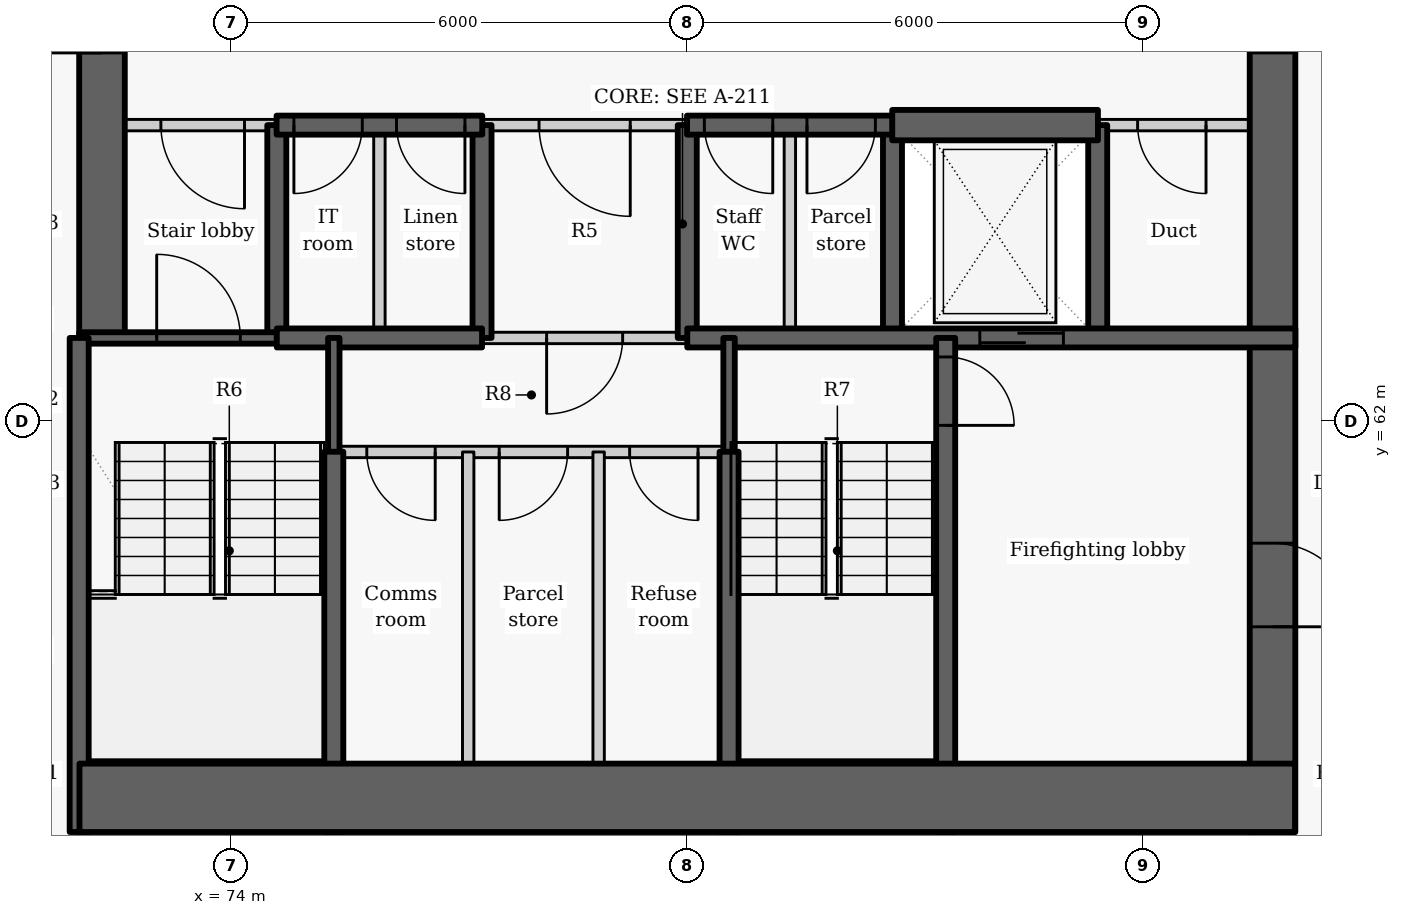
"""IFC4 building model, lengths in metres.
Left out: names, types, materials, properties, quantities, classifications, styles, units other than length and angle.
Written with IfcOpenShell. Run it as: python <this file> out.ifc"""

import sys

from ifc_helpers import new_model, si_unit, direction, frame, frame_2d, origin, place, context, subcontext, project, spatial, rectangle, extrude, element, fill, save


model = new_model("IFC4")
c1 = context("Model", 3, precision=1e-05, world=origin(), true_north=direction((0.0, 1.0)))
c2 = subcontext(c1, "Body", "Model", "MODEL_VIEW")
j1 = project(units=[si_unit("LENGTHUNIT", "METRE"), si_unit("PLANEANGLEUNIT", "RADIAN")], contexts=[c1])
p1 = place(None, origin())
s1 = spatial("IfcSite", under=j1, at=p1, CompositionType="ELEMENT")
p2 = place(p1, origin())
s2 = spatial("IfcBuilding", under=s1, at=p2, CompositionType="ELEMENT")
p3 = place(p2, frame((0.0, 0.0, 41.4)))
s3 = spatial("IfcBuildingStorey", under=s2, at=p3, CompositionType="ELEMENT", Elevation=41.4)
p4 = place(p3, frame((74.6, 63.1, -0.275), z_axis=(0.0, 0.0, 1.0), x_axis=(0.0, 1.0, 0.0)))
e1 = element("IfcWall", 1, at=p4, inside=s3, PredefinedType="SHEAR", context=c2, shape_type="SweptSolid", body=[
    extrude(rectangle(XDim=2.8, YDim=0.25, at=frame_2d((1.4, 0.0))), origin(), (0.0, 0.0, 1.0), 3.3),
])
p5 = place(p3, frame((72.3, 63.1, -0.275), z_axis=(0.0, 0.0, 1.0), x_axis=(0.0, 1.0, 0.0)))
e2 = element("IfcWall", 2, at=p5, inside=s3, PredefinedType="SHEAR", context=c2, shape_type="SweptSolid", body=[
    extrude(rectangle(XDim=9.1, YDim=0.6, at=frame_2d((4.55, 0.0))), origin(), (0.0, 0.0, 1.0), 3.3),
])
p6 = place(p5, frame((3.75, 0.0, 0.275)))
e3 = element("IfcOpeningElement", 3, at=p6, cuts=e2, PredefinedType="OPENING", context=c2, shape_type="SweptSolid", body=[
    extrude(rectangle(XDim=1.5, YDim=2.1, at=frame_2d((0.75, 1.05))), frame((0.0, 0.31, 0.0), z_axis=(0.0, -1.0, 0.0), x_axis=(1.0, 0.0, 0.0)), (0.0, 0.0, 1.0), 0.62),
])
for number, where, z_axis, x_axis in (
    (4, (77.3, 63.1, -0.275), (0.0, 0.0, 1.0), (0.0, 1.0, 0.0)),
    (5, (80.0, 63.1, -0.275), (0.0, 0.0, 1.0), (0.0, 1.0, 0.0)),
    (6, (82.7, 63.1, -0.275), (0.0, 0.0, 1.0), (0.0, 1.0, 0.0)),
    (7, (85.4, 63.1, -0.275), (0.0, 0.0, 1.0), (0.0, 1.0, 0.0)),
):
    element("IfcWall", number, at=place(p3, frame(where, z_axis=z_axis, x_axis=x_axis)), inside=s3, PredefinedType="SHEAR", context=c2, shape_type="SweptSolid", body=[
        extrude(rectangle(XDim=2.8, YDim=0.25, at=frame_2d((1.4, 0.0))), origin(), (0.0, 0.0, 1.0), 3.3),
    ])
p7 = place(p3, frame((87.7, 72.2, -0.275), z_axis=(0.0, 0.0, 1.0), x_axis=(0.0, -1.0, 0.0)))
e8 = element("IfcWall", 8, at=p7, inside=s3, PredefinedType="SHEAR", context=c2, shape_type="SweptSolid", body=[
    extrude(rectangle(XDim=15.6, YDim=0.6, at=frame_2d((7.8, 0.0))), origin(), (0.0, 0.0, 1.0), 3.3),
])
p8 = place(p7, frame((3.85, 0.0, 0.275)))
e9 = element("IfcOpeningElement", 9, at=p8, cuts=e8, PredefinedType="OPENING", context=c2, shape_type="SweptSolid", body=[
    extrude(rectangle(XDim=1.5, YDim=2.1, at=frame_2d((0.75, 1.05))), frame((0.0, 0.31, 0.0), z_axis=(0.0, -1.0, 0.0), x_axis=(1.0, 0.0, 0.0)), (0.0, 0.0, 1.0), 0.62),
])
p9 = place(p7, frame((11.8, 0.0, 0.275)))
e10 = element("IfcOpeningElement", 10, at=p9, cuts=e8, PredefinedType="OPENING", context=c2, shape_type="SweptSolid", body=[
    extrude(rectangle(XDim=1.1, YDim=2.1, at=frame_2d((0.55, 1.05))), frame((0.0, 0.31, 0.0), z_axis=(0.0, -1.0, 0.0), x_axis=(1.0, 0.0, 0.0)), (0.0, 0.0, 1.0), 0.62),
])
p10 = place(p3, frame((74.603, 65.9, 0.0), z_axis=(0.0, 0.0, 1.0), x_axis=(-1.0, 0.0, 0.0)))
e11 = element("IfcWall", 11, at=p10, inside=s3, PredefinedType="PARTITIONING", context=c2, shape_type="SweptSolid", body=[
    extrude(rectangle(XDim=2.603, YDim=0.15, at=frame_2d((1.302, 0.0))), origin(), (0.0, 0.0, 1.0), 3.025),
])
p11 = place(p10, frame((0.428, 0.0, 0.0)))
e12 = element("IfcOpeningElement", 12, at=p11, cuts=e11, PredefinedType="OPENING", context=c2, shape_type="SweptSolid", body=[
    extrude(rectangle(XDim=1.1, YDim=2.1, at=frame_2d((0.55, 1.05))), frame((0.0, 0.085, 0.0), z_axis=(0.0, -1.0, 0.0), x_axis=(1.0, 0.0, 0.0)), (0.0, 0.0, 1.0), 0.17),
])
p12 = place(p3, frame((80.003, 65.9, 0.0), z_axis=(0.0, 0.0, 1.0), x_axis=(-1.0, 0.0, 0.0)))
e13 = element("IfcWall", 13, at=p12, inside=s3, PredefinedType="PARTITIONING", context=c2, shape_type="SweptSolid", body=[
    extrude(rectangle(XDim=2.706, YDim=0.15, at=frame_2d((1.353, 0.0))), origin(), (0.0, 0.0, 1.0), 3.025),
])
p13 = place(p12, frame((0.753, 0.0, 0.0)))
e14 = element("IfcOpeningElement", 14, at=p13, cuts=e13, PredefinedType="OPENING", context=c2, shape_type="SweptSolid", body=[
    extrude(rectangle(XDim=1.2, YDim=2.1, at=frame_2d((0.6, 1.05))), frame((0.0, 0.085, 0.0), z_axis=(0.0, -1.0, 0.0), x_axis=(1.0, 0.0, 0.0)), (0.0, 0.0, 1.0), 0.17),
])
p14 = place(p3, frame((88.0, 65.9, 0.0), z_axis=(0.0, 0.0, 1.0), x_axis=(-1.0, 0.0, 0.0)))
e15 = element("IfcWall", 15, at=p14, inside=s3, PredefinedType="PARTITIONING", context=c2, shape_type="SweptSolid", body=[
    extrude(rectangle(XDim=2.603, YDim=0.15, at=frame_2d((1.302, 0.0))), origin(), (0.0, 0.0, 1.0), 3.025),
])
p15 = place(p14, frame((1.175, 0.0, 0.0)))
e16 = element("IfcOpeningElement", 16, at=p15, cuts=e15, PredefinedType="OPENING", context=c2, shape_type="SweptSolid", body=[
    extrude(rectangle(XDim=0.9, YDim=2.1, at=frame_2d((0.45, 1.05))), frame((0.0, 0.085, 0.0), z_axis=(0.0, -1.0, 0.0), x_axis=(1.0, 0.0, 0.0)), (0.0, 0.0, 1.0), 0.17),
])
p16 = place(p3, frame((77.303, 65.9, -0.275), z_axis=(0.0, 0.0, 1.0), x_axis=(-1.0, 0.0, 0.0)))
e17 = element("IfcWall", 17, at=p16, inside=s3, PredefinedType="SHEAR", context=c2, shape_type="SweptSolid", body=[
    extrude(rectangle(XDim=2.706, YDim=0.25, at=frame_2d((1.353, 0.0))), origin(), (0.0, 0.0, 1.0), 3.3),
])
p17 = place(p16, frame((1.578, 0.0, 0.275)))
e18 = element("IfcOpeningElement", 18, at=p17, cuts=e17, PredefinedType="OPENING", context=c2, shape_type="SweptSolid", body=[
    extrude(rectangle(XDim=0.9, YDim=2.1, at=frame_2d((0.45, 1.05))), frame((0.0, 0.135, 0.0), z_axis=(0.0, -1.0, 0.0), x_axis=(1.0, 0.0, 0.0)), (0.0, 0.0, 1.0), 0.27),
])
p18 = place(p16, frame((0.228, 0.0, 0.275)))
e19 = element("IfcOpeningElement", 19, at=p18, cuts=e17, PredefinedType="OPENING", context=c2, shape_type="SweptSolid", body=[
    extrude(rectangle(XDim=0.9, YDim=2.1, at=frame_2d((0.45, 1.05))), frame((0.0, 0.135, 0.0), z_axis=(0.0, -1.0, 0.0), x_axis=(1.0, 0.0, 0.0)), (0.0, 0.0, 1.0), 0.27),
])
p19 = place(p3, frame((82.703, 65.9, -0.275), z_axis=(0.0, 0.0, 1.0), x_axis=(-1.0, 0.0, 0.0)))
e20 = element("IfcWall", 20, at=p19, inside=s3, PredefinedType="SHEAR", context=c2, shape_type="SweptSolid", body=[
    extrude(rectangle(XDim=2.706, YDim=0.25, at=frame_2d((1.353, 0.0))), origin(), (0.0, 0.0, 1.0), 3.3),
])
p20 = place(p19, frame((1.578, 0.0, 0.275)))
e21 = element("IfcOpeningElement", 21, at=p20, cuts=e20, PredefinedType="OPENING", context=c2, shape_type="SweptSolid", body=[
    extrude(rectangle(XDim=0.9, YDim=2.1, at=frame_2d((0.45, 1.05))), frame((0.0, 0.135, 0.0), z_axis=(0.0, -1.0, 0.0), x_axis=(1.0, 0.0, 0.0)), (0.0, 0.0, 1.0), 0.27),
])
p21 = place(p19, frame((0.228, 0.0, 0.275)))
e22 = element("IfcOpeningElement", 22, at=p21, cuts=e20, PredefinedType="OPENING", context=c2, shape_type="SweptSolid", body=[
    extrude(rectangle(XDim=0.9, YDim=2.1, at=frame_2d((0.45, 1.05))), frame((0.0, 0.135, 0.0), z_axis=(0.0, -1.0, 0.0), x_axis=(1.0, 0.0, 0.0)), (0.0, 0.0, 1.0), 0.27),
])
p22 = place(p3, frame((82.697, 65.9, -0.275), z_axis=(0.0, 0.0, 1.0), x_axis=(1.0, 0.0, 0.0)))
e23 = element("IfcWall", 23, at=p22, inside=s3, PredefinedType="SHEAR", context=c2, shape_type="SweptSolid", body=[
    extrude(rectangle(XDim=2.706, YDim=0.4, at=frame_2d((1.353, 0.0))), origin(), (0.0, 0.0, 1.0), 3.3),
])
p23 = place(p3, frame((72.0, 63.1, -0.275), z_axis=(0.0, 0.0, 1.0), x_axis=(1.0, 0.0, 0.0)))
e24 = element("IfcWall", 24, at=p23, inside=s3, PredefinedType="SHEAR", context=c2, shape_type="SweptSolid", body=[
    extrude(rectangle(XDim=2.6, YDim=0.15, at=frame_2d((1.3, 0.0))), origin(), (0.0, 0.0, 1.0), 3.3),
])
p24 = place(p23, frame((1.02, 0.0, 0.275)))
e25 = element("IfcOpeningElement", 25, at=p24, cuts=e24, PredefinedType="OPENING", context=c2, shape_type="SweptSolid", body=[
    extrude(rectangle(XDim=1.1, YDim=2.1, at=frame_2d((0.55, 1.05))), frame((0.0, 0.085, 0.0), z_axis=(0.0, -1.0, 0.0), x_axis=(1.0, 0.0, 0.0)), (0.0, 0.0, 1.0), 0.17),
])
p25 = place(p3, frame((75.95, 63.1, 0.0), z_axis=(0.0, 0.0, 1.0), x_axis=(0.0, 1.0, 0.0)))
e26 = element("IfcWall", 26, at=p25, inside=s3, PredefinedType="PARTITIONING", context=c2, shape_type="SweptSolid", body=[
    extrude(rectangle(XDim=2.8, YDim=0.15, at=frame_2d((1.4, 0.0))), origin(), (0.0, 0.0, 1.0), 3.025),
])
p26 = place(p3, frame((74.6, 63.1, -0.275), z_axis=(0.0, 0.0, 1.0), x_axis=(1.0, 0.0, 0.0)))
e27 = element("IfcWall", 27, at=p26, inside=s3, PredefinedType="SHEAR", context=c2, shape_type="SweptSolid", body=[
    extrude(rectangle(XDim=2.7, YDim=0.25, at=frame_2d((1.35, 0.0))), origin(), (0.0, 0.0, 1.0), 3.3),
])
p27 = place(p3, frame((80.0, 63.1, -0.275), z_axis=(0.0, 0.0, 1.0), x_axis=(1.0, 0.0, 0.0)))
e28 = element("IfcWall", 28, at=p27, inside=s3, PredefinedType="SHEAR", context=c2, shape_type="SweptSolid", body=[
    extrude(rectangle(XDim=8.0, YDim=0.25, at=frame_2d((4.0, 0.0))), origin(), (0.0, 0.0, 1.0), 3.3),
])
p28 = place(p27, frame((3.849, 0.0, 0.275)))
e29 = element("IfcOpeningElement", 29, at=p28, cuts=e28, PredefinedType="OPENING", context=c2, shape_type="SweptSolid", body=[
    extrude(rectangle(XDim=1.1, YDim=2.1, at=frame_2d((0.55, 1.05))), frame((0.0, 0.135, 0.0), z_axis=(0.0, -1.0, 0.0), x_axis=(1.0, 0.0, 0.0)), (0.0, 0.0, 1.0), 0.27),
])
p29 = place(p3, frame((80.0, 63.1, 0.0), z_axis=(0.0, 0.0, 1.0), x_axis=(-1.0, 0.0, 0.0)))
e30 = element("IfcWall", 30, at=p29, inside=s3, PredefinedType="PARTITIONING", context=c2, shape_type="SweptSolid", body=[
    extrude(rectangle(XDim=2.7, YDim=0.15, at=frame_2d((1.35, 0.0))), origin(), (0.0, 0.0, 1.0), 3.025),
])
p30 = place(p29, frame((0.85, 0.0, 0.0)))
e31 = element("IfcOpeningElement", 31, at=p30, cuts=e30, PredefinedType="OPENING", context=c2, shape_type="SweptSolid", body=[
    extrude(rectangle(XDim=1.0, YDim=2.1, at=frame_2d((0.5, 1.05))), frame((0.0, 0.085, 0.0), z_axis=(0.0, -1.0, 0.0), x_axis=(1.0, 0.0, 0.0)), (0.0, 0.0, 1.0), 0.17),
])
p31 = place(p3, frame((81.35, 63.1, 0.0), z_axis=(0.0, 0.0, 1.0), x_axis=(0.0, 1.0, 0.0)))
e32 = element("IfcWall", 32, at=p31, inside=s3, PredefinedType="PARTITIONING", context=c2, shape_type="SweptSolid", body=[
    extrude(rectangle(XDim=2.8, YDim=0.15, at=frame_2d((1.4, 0.0))), origin(), (0.0, 0.0, 1.0), 3.025),
])
p32 = place(p3, frame((75.35, 61.597, -0.275), z_axis=(0.0, 0.0, 1.0), x_axis=(0.0, 1.0, 0.0)))
e33 = element("IfcWall", 33, at=p32, inside=s3, PredefinedType="SHEAR", context=c2, shape_type="SweptSolid", body=[
    extrude(rectangle(XDim=1.503, YDim=0.15, at=frame_2d((0.751, 0.0))), origin(), (0.0, 0.0, 1.0), 3.3),
])
p33 = place(p3, frame((75.35, 56.6, -0.275), z_axis=(0.0, 0.0, 1.0), x_axis=(0.0, 1.0, 0.0)))
e34 = element("IfcWall", 34, at=p33, inside=s3, PredefinedType="SHEAR", context=c2, shape_type="SweptSolid", body=[
    extrude(rectangle(XDim=5.003, YDim=0.25, at=frame_2d((2.501, 0.0))), origin(), (0.0, 0.0, 1.0), 3.3),
])
p34 = place(p3, frame((72.0, 56.6, -0.275), z_axis=(0.0, 0.0, 1.0), x_axis=(0.0, 1.0, 0.0)))
e35 = element("IfcWall", 35, at=p34, inside=s3, PredefinedType="SHEAR", context=c2, shape_type="SweptSolid", body=[
    extrude(rectangle(XDim=6.5, YDim=0.25, at=frame_2d((3.25, 0.0))), origin(), (0.0, 0.0, 1.0), 3.3),
])
p35 = place(p3, frame((83.4, 63.1, -0.275), z_axis=(0.0, 0.0, 1.0), x_axis=(0.0, -1.0, 0.0)))
e36 = element("IfcWall", 36, at=p35, inside=s3, PredefinedType="SHEAR", context=c2, shape_type="SweptSolid", body=[
    extrude(rectangle(XDim=6.5, YDim=0.25, at=frame_2d((3.25, 0.0))), origin(), (0.0, 0.0, 1.0), 3.3),
])
p36 = place(p35, frame((0.25, 0.0, 0.275)))
e37 = element("IfcOpeningElement", 37, at=p36, cuts=e36, PredefinedType="OPENING", context=c2, shape_type="SweptSolid", body=[
    extrude(rectangle(XDim=0.9, YDim=2.1, at=frame_2d((0.45, 1.05))), frame((0.0, 0.135, 0.0), z_axis=(0.0, -1.0, 0.0), x_axis=(1.0, 0.0, 0.0)), (0.0, 0.0, 1.0), 0.27),
])
p37 = place(p3, frame((80.55, 61.597, -0.275), z_axis=(0.0, 0.0, 1.0), x_axis=(0.0, 1.0, 0.0)))
e38 = element("IfcWall", 38, at=p37, inside=s3, PredefinedType="SHEAR", context=c2, shape_type="SweptSolid", body=[
    extrude(rectangle(XDim=1.503, YDim=0.15, at=frame_2d((0.751, 0.0))), origin(), (0.0, 0.0, 1.0), 3.3),
])
p38 = place(p3, frame((80.55, 56.6, -0.275), z_axis=(0.0, 0.0, 1.0), x_axis=(0.0, 1.0, 0.0)))
e39 = element("IfcWall", 39, at=p38, inside=s3, PredefinedType="SHEAR", context=c2, shape_type="SweptSolid", body=[
    extrude(rectangle(XDim=5.003, YDim=0.25, at=frame_2d((2.501, 0.0))), origin(), (0.0, 0.0, 1.0), 3.3),
])
p39 = place(p3, frame((80.55, 61.6, 0.0), z_axis=(0.0, 0.0, 1.0), x_axis=(-1.0, 0.0, 0.0)))
e40 = element("IfcWall", 40, at=p39, inside=s3, PredefinedType="PARTITIONING", context=c2, shape_type="SweptSolid", body=[
    extrude(rectangle(XDim=5.2, YDim=0.15, at=frame_2d((2.6, 0.0))), origin(), (0.0, 0.0, 1.0), 3.025),
])
p40 = place(p39, frame((3.866, 0.0, 0.0)))
e41 = element("IfcOpeningElement", 41, at=p40, cuts=e40, PredefinedType="OPENING", context=c2, shape_type="SweptSolid", body=[
    extrude(rectangle(XDim=0.9, YDim=2.1, at=frame_2d((0.45, 1.05))), frame((0.0, 0.085, 0.0), z_axis=(0.0, -1.0, 0.0), x_axis=(1.0, 0.0, 0.0)), (0.0, 0.0, 1.0), 0.17),
])
p41 = place(p39, frame((2.124, 0.0, 0.0)))
e42 = element("IfcOpeningElement", 42, at=p41, cuts=e40, PredefinedType="OPENING", context=c2, shape_type="SweptSolid", body=[
    extrude(rectangle(XDim=0.9, YDim=2.1, at=frame_2d((0.45, 1.05))), frame((0.0, 0.085, 0.0), z_axis=(0.0, -1.0, 0.0), x_axis=(1.0, 0.0, 0.0)), (0.0, 0.0, 1.0), 0.17),
])
p42 = place(p39, frame((0.408, 0.0, 0.0)))
e43 = element("IfcOpeningElement", 43, at=p42, cuts=e40, PredefinedType="OPENING", context=c2, shape_type="SweptSolid", body=[
    extrude(rectangle(XDim=0.9, YDim=2.1, at=frame_2d((0.45, 1.05))), frame((0.0, 0.085, 0.0), z_axis=(0.0, -1.0, 0.0), x_axis=(1.0, 0.0, 0.0)), (0.0, 0.0, 1.0), 0.17),
])
for number, where, z_axis, x_axis in (
    (44, (77.118, 56.6, 0.0), (0.0, 0.0, 1.0), (0.0, 1.0, 0.0)),
    (45, (78.834, 56.6, 0.0), (0.0, 0.0, 1.0), (0.0, 1.0, 0.0)),
):
    element("IfcWall", number, at=place(p3, frame(where, z_axis=z_axis, x_axis=x_axis)), inside=s3, PredefinedType="PARTITIONING", context=c2, shape_type="SweptSolid", body=[
        extrude(rectangle(XDim=5.0, YDim=0.15, at=frame_2d((2.5, 0.0))), origin(), (0.0, 0.0, 1.0), 3.025),
    ])
p43 = place(p3, frame((72.004, 57.05, -0.275), z_axis=(0.0, 0.0, 1.0), x_axis=(1.0, 0.0, 0.0)))
e46 = element("IfcWall", 46, at=p43, inside=s3, PredefinedType="SHEAR", context=c2, shape_type="SweptSolid", body=[
    extrude(rectangle(XDim=15.992, YDim=0.9, at=frame_2d((7.996, 0.0))), origin(), (0.0, 0.0, 1.0), 3.3),
])
p44 = place(p11, origin())
e47 = element("IfcDoor", 47, at=p44, inside=s3, OperationType="SINGLE_SWING_LEFT", PredefinedType="DOOR", context=c2, shape_type="SweptSolid", body=[
    extrude(rectangle(XDim=1.1, YDim=2.1, at=frame_2d((0.55, 1.05))), frame((0.0, 0.025, 0.0), z_axis=(0.0, -1.0, 0.0), x_axis=(1.0, 0.0, 0.0)), (0.0, 0.0, 1.0), 0.05),
])
fill(e12, e47)
p45 = place(p17, origin())
e48 = element("IfcDoor", 48, at=p45, inside=s3, OperationType="SINGLE_SWING_RIGHT", PredefinedType="DOOR", context=c2, shape_type="SweptSolid", body=[
    extrude(rectangle(XDim=0.9, YDim=2.1, at=frame_2d((0.45, 1.05))), frame((0.0, 0.025, 0.0), z_axis=(0.0, -1.0, 0.0), x_axis=(1.0, 0.0, 0.0)), (0.0, 0.0, 1.0), 0.05),
])
fill(e18, e48)
p46 = place(p18, origin())
e49 = element("IfcDoor", 49, at=p46, inside=s3, OperationType="SINGLE_SWING_LEFT", PredefinedType="DOOR", context=c2, shape_type="SweptSolid", body=[
    extrude(rectangle(XDim=0.9, YDim=2.1, at=frame_2d((0.45, 1.05))), frame((0.0, 0.025, 0.0), z_axis=(0.0, -1.0, 0.0), x_axis=(1.0, 0.0, 0.0)), (0.0, 0.0, 1.0), 0.05),
])
fill(e19, e49)
p47 = place(p13, origin())
e50 = element("IfcDoor", 50, at=p47, inside=s3, OperationType="DOUBLE_DOOR_SINGLE_SWING", PredefinedType="DOOR", context=c2, shape_type="SweptSolid", body=[
    extrude(rectangle(XDim=1.2, YDim=2.1, at=frame_2d((0.6, 1.05))), frame((0.0, 0.025, 0.0), z_axis=(0.0, -1.0, 0.0), x_axis=(1.0, 0.0, 0.0)), (0.0, 0.0, 1.0), 0.05),
])
fill(e14, e50)
p48 = place(p20, origin())
e51 = element("IfcDoor", 51, at=p48, inside=s3, OperationType="SINGLE_SWING_LEFT", PredefinedType="DOOR", context=c2, shape_type="SweptSolid", body=[
    extrude(rectangle(XDim=0.9, YDim=2.1, at=frame_2d((0.45, 1.05))), frame((0.0, 0.025, 0.0), z_axis=(0.0, -1.0, 0.0), x_axis=(1.0, 0.0, 0.0)), (0.0, 0.0, 1.0), 0.05),
])
fill(e21, e51)
p49 = place(p21, origin())
e52 = element("IfcDoor", 52, at=p49, inside=s3, OperationType="SINGLE_SWING_RIGHT", PredefinedType="DOOR", context=c2, shape_type="SweptSolid", body=[
    extrude(rectangle(XDim=0.9, YDim=2.1, at=frame_2d((0.45, 1.05))), frame((0.0, 0.025, 0.0), z_axis=(0.0, -1.0, 0.0), x_axis=(1.0, 0.0, 0.0)), (0.0, 0.0, 1.0), 0.05),
])
fill(e22, e52)
p50 = place(p28, origin())
e53 = element("IfcDoor", 53, at=p50, inside=s3, OperationType="SLIDING_TO_LEFT", PredefinedType="DOOR", context=c2, shape_type="SweptSolid", body=[
    extrude(rectangle(XDim=1.1, YDim=2.1, at=frame_2d((0.55, 1.05))), frame((0.0, 0.025, 0.0), z_axis=(0.0, -1.0, 0.0), x_axis=(1.0, 0.0, 0.0)), (0.0, 0.0, 1.0), 0.05),
])
fill(e29, e53)
p51 = place(p15, origin())
e54 = element("IfcDoor", 54, at=p51, inside=s3, OperationType="SINGLE_SWING_LEFT", PredefinedType="DOOR", context=c2, shape_type="SweptSolid", body=[
    extrude(rectangle(XDim=0.9, YDim=2.1, at=frame_2d((0.45, 1.05))), frame((0.0, 0.025, 0.0), z_axis=(0.0, -1.0, 0.0), x_axis=(1.0, 0.0, 0.0)), (0.0, 0.0, 1.0), 0.05),
])
fill(e16, e54)
p52 = place(p30, origin())
e55 = element("IfcDoor", 55, at=p52, inside=s3, OperationType="SINGLE_SWING_RIGHT", PredefinedType="DOOR", context=c2, shape_type="SweptSolid", body=[
    extrude(rectangle(XDim=1.0, YDim=2.1, at=frame_2d((0.5, 1.05))), frame((0.0, 0.025, 0.0), z_axis=(0.0, -1.0, 0.0), x_axis=(1.0, 0.0, 0.0)), (0.0, 0.0, 1.0), 0.05),
])
fill(e31, e55)
p53 = place(p40, origin())
e56 = element("IfcDoor", 56, at=p53, inside=s3, OperationType="SINGLE_SWING_LEFT", PredefinedType="DOOR", context=c2, shape_type="SweptSolid", body=[
    extrude(rectangle(XDim=0.9, YDim=2.1, at=frame_2d((0.45, 1.05))), frame((0.0, 0.025, 0.0), z_axis=(0.0, -1.0, 0.0), x_axis=(1.0, 0.0, 0.0)), (0.0, 0.0, 1.0), 0.05),
])
fill(e41, e56)
p54 = place(p41, origin())
e57 = element("IfcDoor", 57, at=p54, inside=s3, OperationType="SINGLE_SWING_RIGHT", PredefinedType="DOOR", context=c2, shape_type="SweptSolid", body=[
    extrude(rectangle(XDim=0.9, YDim=2.1, at=frame_2d((0.45, 1.05))), frame((0.0, 0.025, 0.0), z_axis=(0.0, -1.0, 0.0), x_axis=(1.0, 0.0, 0.0)), (0.0, 0.0, 1.0), 0.05),
])
fill(e42, e57)
p55 = place(p42, origin())
e58 = element("IfcDoor", 58, at=p55, inside=s3, OperationType="SINGLE_SWING_LEFT", PredefinedType="DOOR", context=c2, shape_type="SweptSolid", body=[
    extrude(rectangle(XDim=0.9, YDim=2.1, at=frame_2d((0.45, 1.05))), frame((0.0, 0.025, 0.0), z_axis=(0.0, -1.0, 0.0), x_axis=(1.0, 0.0, 0.0)), (0.0, 0.0, 1.0), 0.05),
])
fill(e43, e58)
p56 = place(p24, origin())
e59 = element("IfcDoor", 59, at=p56, inside=s3, OperationType="SINGLE_SWING_LEFT", PredefinedType="DOOR", context=c2, shape_type="SweptSolid", body=[
    extrude(rectangle(XDim=1.1, YDim=2.1, at=frame_2d((0.55, 1.05))), frame((0.0, 0.025, 0.0), z_axis=(0.0, -1.0, 0.0), x_axis=(1.0, 0.0, 0.0)), (0.0, 0.0, 1.0), 0.05),
])
fill(e25, e59)
p57 = place(p36, origin())
e60 = element("IfcDoor", 60, at=p57, inside=s3, OperationType="SINGLE_SWING_RIGHT", PredefinedType="DOOR", context=c2, shape_type="SweptSolid", body=[
    extrude(rectangle(XDim=0.9, YDim=2.1, at=frame_2d((0.45, 1.05))), frame((0.0, 0.025, 0.0), z_axis=(0.0, -1.0, 0.0), x_axis=(1.0, 0.0, 0.0)), (0.0, 0.0, 1.0), 0.05),
])
fill(e37, e60)
p58 = place(p8, origin())
e61 = element("IfcDoor", 61, at=p58, inside=s3, OperationType="DOUBLE_DOOR_SINGLE_SWING", PredefinedType="DOOR", context=c2, shape_type="SweptSolid", body=[
    extrude(rectangle(XDim=1.5, YDim=2.1, at=frame_2d((0.75, 1.05))), frame((0.0, 0.025, 0.0), z_axis=(0.0, -1.0, 0.0), x_axis=(1.0, 0.0, 0.0)), (0.0, 0.0, 1.0), 0.05),
])
fill(e9, e61)
p59 = place(p9, origin())
e62 = element("IfcDoor", 62, at=p59, inside=s3, OperationType="SINGLE_SWING_RIGHT", PredefinedType="DOOR", context=c2, shape_type="SweptSolid", body=[
    extrude(rectangle(XDim=1.1, YDim=2.1, at=frame_2d((0.55, 1.05))), frame((0.0, 0.025, 0.0), z_axis=(0.0, -1.0, 0.0), x_axis=(1.0, 0.0, 0.0)), (0.0, 0.0, 1.0), 0.05),
])
fill(e10, e62)
save(model, sys.argv[1])
